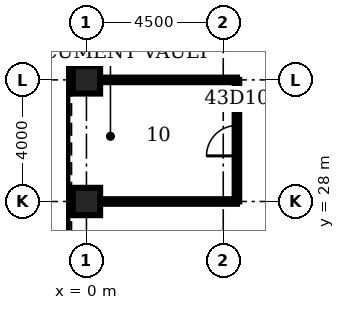
"""IFC4 building model, lengths in metres.
Left out: names, types, materials, properties, quantities, classifications, styles, units other than length and angle.
Written with IfcOpenShell. Run it as: python <this file> out.ifc"""

import sys

from ifc_helpers import new_model, si_unit, direction, frame, frame_2d, origin, origin_2d, place, context, subcontext, project, spatial, rectangle, hollow_rectangle, extrude, element, fill, save


model = new_model("IFC4")
c1 = context("Model", 3, precision=1e-05, world=origin(), true_north=direction((0.0, 1.0)))
c2 = subcontext(c1, "Body", "Model", "MODEL_VIEW")
j1 = project(units=[si_unit("LENGTHUNIT", "METRE"), si_unit("PLANEANGLEUNIT", "RADIAN")], contexts=[c1])
p1 = place(None, origin())
s1 = spatial("IfcSite", under=j1, at=p1, CompositionType="ELEMENT")
p2 = place(p1, origin())
s2 = spatial("IfcBuilding", under=s1, at=p2, CompositionType="ELEMENT")
p3 = place(p2, frame((0.0, 0.0, 194.2)))
s3 = spatial("IfcBuildingStorey", under=s2, at=p3, CompositionType="ELEMENT", Elevation=194.2)
for number, where, z_axis, x_axis in (
    (1, (0.0, 32.0, 0.0), (0.0, 0.0, 1.0), (1.0, 0.0, 0.0)),
    (2, (0.0, 28.0, 0.0), (0.0, 0.0, 1.0), (1.0, 0.0, 0.0)),
):
    element("IfcColumn", number, at=place(p3, frame(where, z_axis=z_axis, x_axis=x_axis)), inside=s3, PredefinedType="COLUMN", context=c2, shape_type="SweptSolid", body=[
        extrude(hollow_rectangle(XDim=0.9, YDim=0.9, WallThickness=0.09, at=origin_2d()), origin(), (0.0, 0.0, 1.0), 4.2),
    ])
for number, where, z_axis, x_axis in (
    (3, (0.45, 28.0, 0.0), (0.0, 0.0, 1.0), (1.0, 0.0, 0.0)),
    (4, (0.45, 32.0, 0.0), (0.0, 0.0, 1.0), (1.0, 0.0, 0.0)),
):
    element("IfcWall", number, at=place(p3, frame(where, z_axis=z_axis, x_axis=x_axis)), inside=s3, PredefinedType="PARTITIONING", context=c2, shape_type="SweptSolid", body=[
        extrude(rectangle(XDim=4.5, YDim=0.15, at=frame_2d((2.25, 0.0))), origin(), (0.0, 0.0, 1.0), 3.0),
    ])
p4 = place(p3, frame((4.95, 28.0, 0.0), z_axis=(0.0, 0.0, 1.0), x_axis=(0.0, 1.0, 0.0)))
e5 = element("IfcWall", 5, at=p4, inside=s3, PredefinedType="PARTITIONING", context=c2, shape_type="SweptSolid", body=[
    extrude(rectangle(XDim=4.0, YDim=0.15, at=frame_2d((2.0, 0.0))), origin(), (0.0, 0.0, 1.0), 3.0),
])
p5 = place(p4, frame((1.5, 0.0, 0.0)))
e6 = element("IfcOpeningElement", 6, at=p5, cuts=e5, PredefinedType="OPENING", context=c2, shape_type="SweptSolid", body=[
    extrude(rectangle(XDim=1.0, YDim=2.1, at=frame_2d((0.5, 1.05))), frame((0.0, 0.085, 0.0), z_axis=(0.0, -1.0, 0.0), x_axis=(1.0, 0.0, 0.0)), (0.0, 0.0, 1.0), 0.17),
])
p6 = place(p5, origin())
e7 = element("IfcDoor", 7, at=p6, inside=s3, OperationType="SINGLE_SWING_LEFT", PredefinedType="DOOR", context=c2, shape_type="SweptSolid", body=[
    extrude(rectangle(XDim=1.0, YDim=2.1, at=frame_2d((0.5, 1.05))), frame((0.0, 0.025, 0.0), z_axis=(0.0, -1.0, 0.0), x_axis=(1.0, 0.0, 0.0)), (0.0, 0.0, 1.0), 0.05),
])
fill(e6, e7)
save(model, sys.argv[1])
